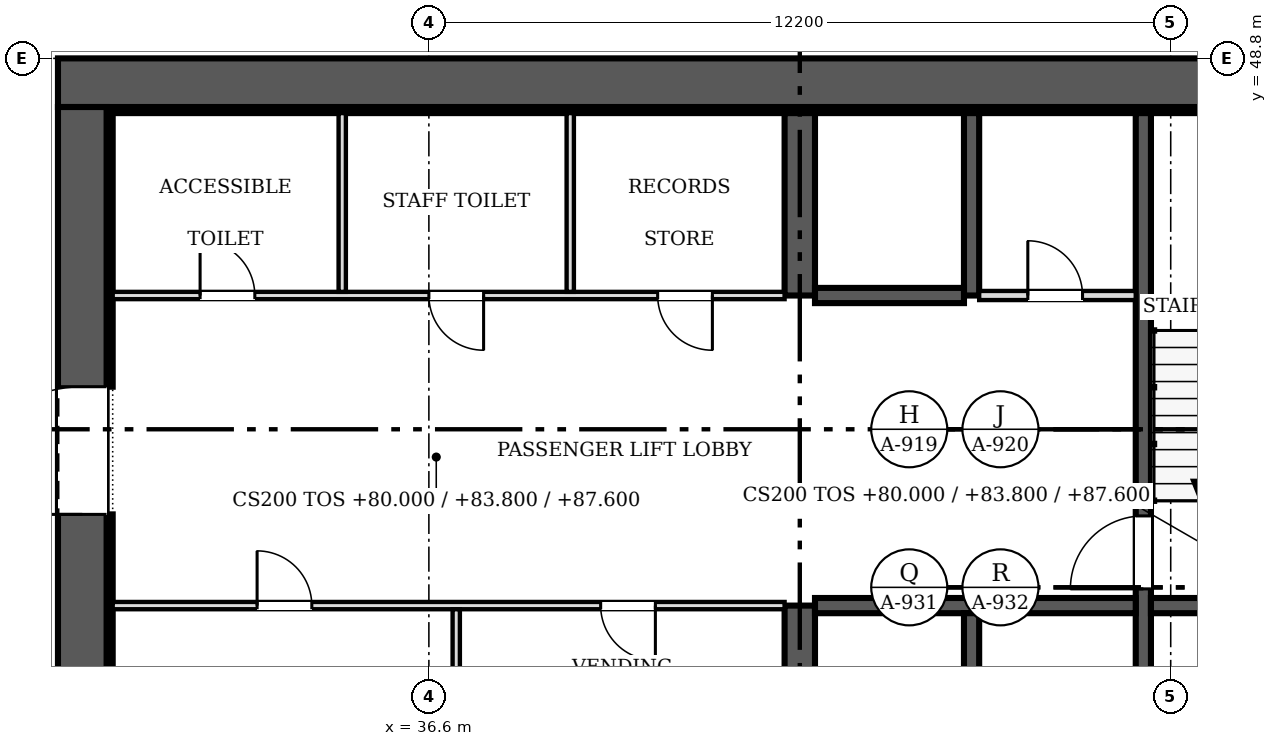
"""IFC4 building model, lengths in metres.
Left out: names, types, materials, properties, quantities, classifications, styles, units other than length and angle.
Written with IfcOpenShell. Run it as: python <this file> out.ifc"""

import sys

from ifc_helpers import new_model, si_unit, direction, frame, frame_2d, origin, place, context, subcontext, project, spatial, rectangle, extrude, source, transform, mapped, element, fill, save


model = new_model("IFC4")
c1 = context("Model", 3, precision=1e-05, world=origin(), true_north=direction((0.0, 1.0)))
c2 = subcontext(c1, "Body", "Model", "MODEL_VIEW")
j1 = project(units=[si_unit("LENGTHUNIT", "METRE"), si_unit("PLANEANGLEUNIT", "RADIAN")], contexts=[c1])
p1 = place(None, origin())
s1 = spatial("IfcSite", under=j1, at=p1, CompositionType="ELEMENT")
p2 = place(p1, origin())
s2 = spatial("IfcBuilding", under=s1, at=p2, CompositionType="ELEMENT")
p3 = place(p2, frame((0.0, 0.0, 80.0)))
s3 = spatial("IfcBuildingStorey", under=s2, at=p3, CompositionType="ELEMENT", Elevation=80.0)
p4 = place(p3, frame((30.9, 25.2, 0.0), z_axis=(0.0, 0.0, 1.0), x_axis=(0.0, 1.0, 0.0)))
e1 = element("IfcWall", 1, at=p4, inside=s3, PredefinedType="SHEAR", context=c2, shape_type="SweptSolid", body=[
    extrude(rectangle(XDim=22.8, YDim=0.8, at=frame_2d((11.4, 0.0))), origin(), (0.0, 0.0, 1.0), 3.8),
])
m1 = source(origin(), c2, "Body", "SweptSolid", [
    extrude(rectangle(XDim=2.1, YDim=2.4, at=frame_2d((1.05, 1.2))), frame((0.0, 0.41, 0.0), z_axis=(0.0, -1.0, 0.0), x_axis=(1.0, 0.0, 0.0)), (0.0, 0.0, 1.0), 0.82),
])
p5 = place(p4, frame((4.6, 0.0, 0.0)))
e2 = element("IfcOpeningElement", 2, at=p5, cuts=e1, PredefinedType="OPENING", context=c2, shape_type="MappedRepresentation", body=[
    mapped(m1, transform((0.0, 0.0, 0.0), scale=1.0)),
])
p6 = place(p4, frame((16.1, 0.0, 0.0)))
e3 = element("IfcOpeningElement", 3, at=p6, cuts=e1, PredefinedType="OPENING", context=c2, shape_type="MappedRepresentation", body=[
    mapped(m1, transform((0.0, 0.0, 0.0), scale=1.0)),
])
p7 = place(p3, frame((30.5, 48.4, 0.0), z_axis=(0.0, 0.0, 1.0), x_axis=(1.0, 0.0, 0.0)))
e4 = element("IfcWall", 4, at=p7, inside=s3, PredefinedType="SHEAR", context=c2, shape_type="SweptSolid", body=[
    extrude(rectangle(XDim=24.4, YDim=0.8, at=frame_2d((12.2, 0.0))), origin(), (0.0, 0.0, 1.0), 3.8),
])
p8 = place(p3, frame((31.3, 47.95, 0.0), z_axis=(0.0, 0.0, 1.0), x_axis=(1.0, 0.0, 0.0)))
e5 = element("IfcWall", 5, at=p8, inside=s3, PredefinedType="SOLIDWALL", context=c2, shape_type="SweptSolid", body=[
    extrude(rectangle(XDim=22.8, YDim=0.1, at=frame_2d((11.4, 0.0))), origin(), (0.0, 0.0, 1.0), 3.8),
])
p9 = place(p3, frame((31.35, 31.9, 0.0), z_axis=(0.0, 0.0, 1.0), x_axis=(0.0, 1.0, 0.0)))
e6 = element("IfcWall", 6, at=p9, inside=s3, PredefinedType="SOLIDWALL", context=c2, shape_type="SweptSolid", body=[
    extrude(rectangle(XDim=9.4, YDim=0.1, at=frame_2d((4.7, 0.0))), origin(), (0.0, 0.0, 1.0), 3.8),
])
p10 = place(p3, frame((31.35, 43.4, 0.0), z_axis=(0.0, 0.0, 1.0), x_axis=(0.0, 1.0, 0.0)))
e7 = element("IfcWall", 7, at=p10, inside=s3, PredefinedType="SOLIDWALL", context=c2, shape_type="SweptSolid", body=[
    extrude(rectangle(XDim=4.5, YDim=0.1, at=frame_2d((2.25, 0.0))), origin(), (0.0, 0.0, 1.0), 3.8),
])
p11 = place(p3, frame((42.7, 36.85, 0.0), z_axis=(0.0, 0.0, 1.0), x_axis=(0.0, 1.0, 0.0)))
e8 = element("IfcWall", 8, at=p11, inside=s3, PredefinedType="SHEAR", context=c2, shape_type="SweptSolid", body=[
    extrude(rectangle(XDim=2.95, YDim=0.5, at=frame_2d((1.475, 0.0))), origin(), (0.0, 0.0, 1.0), 3.8),
])
p12 = place(p3, frame((42.7, 44.9, 0.0), z_axis=(0.0, 0.0, 1.0), x_axis=(0.0, 1.0, 0.0)))
e9 = element("IfcWall", 9, at=p12, inside=s3, PredefinedType="SHEAR", context=c2, shape_type="SweptSolid", body=[
    extrude(rectangle(XDim=3.0, YDim=0.5, at=frame_2d((1.5, 0.0))), origin(), (0.0, 0.0, 1.0), 3.8),
])
p13 = place(p3, frame((48.35, 47.9, 0.0), z_axis=(0.0, 0.0, 1.0), x_axis=(0.0, -1.0, 0.0)))
e10 = element("IfcWall", 10, at=p13, inside=s3, PredefinedType="SOLIDWALL", context=c2, shape_type="SweptSolid", body=[
    extrude(rectangle(XDim=11.05, YDim=0.25, at=frame_2d((5.525, 0.0))), origin(), (0.0, 0.0, 1.0), 3.8),
])
m2 = source(origin(), c2, "Body", "SweptSolid", [
    extrude(rectangle(XDim=1.2, YDim=2.1, at=frame_2d((0.6, 1.05))), frame((0.0, 0.135, 0.0), z_axis=(0.0, -1.0, 0.0), x_axis=(1.0, 0.0, 0.0)), (0.0, 0.0, 1.0), 0.27),
])
p14 = place(p13, frame((6.625, 0.0, 0.0)))
e11 = element("IfcOpeningElement", 11, at=p14, cuts=e10, PredefinedType="OPENING", context=c2, shape_type="MappedRepresentation", body=[
    mapped(m2, transform((0.0, 0.0, 0.0), scale=1.0)),
])
p15 = place(p3, frame((42.95, 39.8, 0.0), z_axis=(0.0, 0.0, 1.0), x_axis=(1.0, 0.0, 0.0)))
e12 = element("IfcWall", 12, at=p15, inside=s3, PredefinedType="SOLIDWALL", context=c2, shape_type="SweptSolid", body=[
    extrude(rectangle(XDim=5.275, YDim=0.25, at=frame_2d((2.638, 0.0))), origin(), (0.0, 0.0, 1.0), 3.8),
])
p16 = place(p3, frame((48.475, 39.8, 0.0), z_axis=(0.0, 0.0, 1.0), x_axis=(1.0, 0.0, 0.0)))
e13 = element("IfcWall", 13, at=p16, inside=s3, PredefinedType="SOLIDWALL", context=c2, shape_type="SweptSolid", body=[
    extrude(rectangle(XDim=3.525, YDim=0.25, at=frame_2d((1.762, 0.0))), origin(), (0.0, 0.0, 1.0), 3.8),
])
p17 = place(p3, frame((45.525, 36.85, 0.0), z_axis=(0.0, 0.0, 1.0), x_axis=(0.0, 1.0, 0.0)))
e14 = element("IfcWall", 14, at=p17, inside=s3, PredefinedType="SOLIDWALL", context=c2, shape_type="SweptSolid", body=[
    extrude(rectangle(XDim=2.825, YDim=0.25, at=frame_2d((1.413, 0.0))), origin(), (0.0, 0.0, 1.0), 3.8),
])
p18 = place(p3, frame((45.525, 44.9, 0.0), z_axis=(0.0, 0.0, 1.0), x_axis=(0.0, 1.0, 0.0)))
e15 = element("IfcWall", 15, at=p18, inside=s3, PredefinedType="SOLIDWALL", context=c2, shape_type="SweptSolid", body=[
    extrude(rectangle(XDim=3.0, YDim=0.25, at=frame_2d((1.5, 0.0))), origin(), (0.0, 0.0, 1.0), 3.8),
])
p19 = place(p3, frame((42.95, 44.9, 0.0), z_axis=(0.0, 0.0, 1.0), x_axis=(1.0, 0.0, 0.0)))
e16 = element("IfcWall", 16, at=p19, inside=s3, PredefinedType="SOLIDWALL", context=c2, shape_type="SweptSolid", body=[
    extrude(rectangle(XDim=2.45, YDim=0.25, at=frame_2d((1.225, 0.0))), origin(), (0.0, 0.0, 1.0), 3.8),
])
p20 = place(p3, frame((42.45, 39.8, 0.0), z_axis=(0.0, 0.0, 1.0), x_axis=(-1.0, 0.0, 0.0)))
e17 = element("IfcWall", 17, at=p20, inside=s3, PredefinedType="PARTITIONING", context=c2, shape_type="SweptSolid", body=[
    extrude(rectangle(XDim=11.05, YDim=0.12, at=frame_2d((5.525, 0.0))), origin(), (0.0, 0.0, 1.0), 3.6),
])
m3 = source(origin(), c2, "Body", "SweptSolid", [
    extrude(rectangle(XDim=0.9, YDim=2.1, at=frame_2d((0.45, 1.05))), frame((0.0, 0.07, 0.0), z_axis=(0.0, -1.0, 0.0), x_axis=(1.0, 0.0, 0.0)), (0.0, 0.0, 1.0), 0.14),
])
p21 = place(p20, frame((7.775, 0.0, 0.0)))
e18 = element("IfcOpeningElement", 18, at=p21, cuts=e17, PredefinedType="OPENING", context=c2, shape_type="MappedRepresentation", body=[
    mapped(m3, transform((0.0, 0.0, 0.0), scale=1.0)),
])
p22 = place(p20, frame((2.125, 0.0, 0.0)))
e19 = element("IfcOpeningElement", 19, at=p22, cuts=e17, PredefinedType="OPENING", context=c2, shape_type="MappedRepresentation", body=[
    mapped(m3, transform((0.0, 0.0, 0.0), scale=1.0)),
])
p23 = place(p3, frame((31.4, 44.9, 0.0), z_axis=(0.0, 0.0, 1.0), x_axis=(1.0, 0.0, 0.0)))
e20 = element("IfcWall", 20, at=p23, inside=s3, PredefinedType="PARTITIONING", context=c2, shape_type="SweptSolid", body=[
    extrude(rectangle(XDim=11.05, YDim=0.12, at=frame_2d((5.525, 0.0))), origin(), (0.0, 0.0, 1.0), 3.6),
])
p24 = place(p23, frame((1.438, 0.0, 0.0)))
e21 = element("IfcOpeningElement", 21, at=p24, cuts=e20, PredefinedType="OPENING", context=c2, shape_type="MappedRepresentation", body=[
    mapped(m3, transform((0.0, 0.0, 0.0), scale=1.0)),
])
p25 = place(p23, frame((5.2, 0.0, 0.0)))
e22 = element("IfcOpeningElement", 22, at=p25, cuts=e20, PredefinedType="OPENING", context=c2, shape_type="MappedRepresentation", body=[
    mapped(m3, transform((0.0, 0.0, 0.0), scale=1.0)),
])
p26 = place(p23, frame((8.962, 0.0, 0.0)))
e23 = element("IfcOpeningElement", 23, at=p26, cuts=e20, PredefinedType="OPENING", context=c2, shape_type="MappedRepresentation", body=[
    mapped(m3, transform((0.0, 0.0, 0.0), scale=1.0)),
])
p27 = place(p3, frame((37.05, 36.85, 0.0), z_axis=(0.0, 0.0, 1.0), x_axis=(0.0, 1.0, 0.0)))
e24 = element("IfcWall", 24, at=p27, inside=s3, PredefinedType="PARTITIONING", context=c2, shape_type="SweptSolid", body=[
    extrude(rectangle(XDim=2.89, YDim=0.12, at=frame_2d((1.445, 0.0))), origin(), (0.0, 0.0, 1.0), 3.6),
])
for number, where, z_axis, x_axis in (
    (25, (35.175, 44.96, 0.0), (0.0, 0.0, 1.0), (0.0, 1.0, 0.0)),
    (26, (38.925, 44.96, 0.0), (0.0, 0.0, 1.0), (0.0, 1.0, 0.0)),
):
    element("IfcWall", number, at=place(p3, frame(where, z_axis=z_axis, x_axis=x_axis)), inside=s3, PredefinedType="PARTITIONING", context=c2, shape_type="SweptSolid", body=[
        extrude(rectangle(XDim=2.94, YDim=0.12, at=frame_2d((1.47, 0.0))), origin(), (0.0, 0.0, 1.0), 3.6),
    ])
p28 = place(p3, frame((45.65, 44.9, 0.0), z_axis=(0.0, 0.0, 1.0), x_axis=(1.0, 0.0, 0.0)))
e27 = element("IfcWall", 27, at=p28, inside=s3, PredefinedType="PARTITIONING", context=c2, shape_type="SweptSolid", body=[
    extrude(rectangle(XDim=2.575, YDim=0.15, at=frame_2d((1.288, 0.0))), origin(), (0.0, 0.0, 1.0), 3.6),
])
m4 = source(origin(), c2, "Body", "SweptSolid", [
    extrude(rectangle(XDim=0.9, YDim=2.1, at=frame_2d((0.45, 1.05))), frame((0.0, 0.085, 0.0), z_axis=(0.0, -1.0, 0.0), x_axis=(1.0, 0.0, 0.0)), (0.0, 0.0, 1.0), 0.17),
])
p29 = place(p28, frame((0.8, 0.0, 0.0)))
e28 = element("IfcOpeningElement", 28, at=p29, cuts=e27, PredefinedType="OPENING", context=c2, shape_type="MappedRepresentation", body=[
    mapped(m4, transform((0.0, 0.0, 0.0), scale=1.0)),
])
m5 = source(origin(), c2, "Body", "SweptSolid", [
    extrude(rectangle(XDim=2.1, YDim=2.4, at=frame_2d((1.05, 1.2))), frame((0.0, 0.025, 0.0), z_axis=(0.0, -1.0, 0.0), x_axis=(1.0, 0.0, 0.0)), (0.0, 0.0, 1.0), 0.05),
])
p30 = place(p6, origin())
e29 = element("IfcDoor", 29, at=p30, inside=s3, OperationType="DOUBLE_DOOR_SINGLE_SWING", PredefinedType="DOOR", context=c2, shape_type="MappedRepresentation", body=[
    mapped(m5, transform((0.0, 0.0, 0.0), scale=1.0)),
])
fill(e3, e29)
m6 = source(origin(), c2, "Body", "SweptSolid", [
    extrude(rectangle(XDim=1.2, YDim=2.1, at=frame_2d((0.6, 1.05))), frame((0.0, 0.025, 0.0), z_axis=(0.0, -1.0, 0.0), x_axis=(1.0, 0.0, 0.0)), (0.0, 0.0, 1.0), 0.05),
])
p31 = place(p14, origin())
e30 = element("IfcDoor", 30, at=p31, inside=s3, OperationType="SINGLE_SWING_RIGHT", PredefinedType="DOOR", context=c2, shape_type="MappedRepresentation", body=[
    mapped(m6, transform((0.0, 0.0, 0.0), scale=1.0)),
])
fill(e11, e30)
m7 = source(origin(), c2, "Body", "SweptSolid", [
    extrude(rectangle(XDim=0.9, YDim=2.1, at=frame_2d((0.45, 1.05))), frame((0.0, 0.025, 0.0), z_axis=(0.0, -1.0, 0.0), x_axis=(1.0, 0.0, 0.0)), (0.0, 0.0, 1.0), 0.05),
])
p32 = place(p21, origin())
e31 = element("IfcDoor", 31, at=p32, inside=s3, OperationType="SINGLE_SWING_RIGHT", PredefinedType="DOOR", context=c2, shape_type="MappedRepresentation", body=[
    mapped(m7, transform((0.0, 0.0, 0.0), scale=1.0)),
])
fill(e18, e31)
p33 = place(p22, origin())
e32 = element("IfcDoor", 32, at=p33, inside=s3, OperationType="SINGLE_SWING_LEFT", PredefinedType="DOOR", context=c2, shape_type="MappedRepresentation", body=[
    mapped(m7, transform((0.0, 0.0, 0.0), scale=1.0)),
])
fill(e19, e32)
p34 = place(p24, origin())
e33 = element("IfcDoor", 33, at=p34, inside=s3, OperationType="SINGLE_SWING_LEFT", PredefinedType="DOOR", context=c2, shape_type="MappedRepresentation", body=[
    mapped(m7, transform((0.0, 0.0, 0.0), scale=1.0)),
])
fill(e21, e33)
p35 = place(p25, origin())
e34 = element("IfcDoor", 34, at=p35, inside=s3, OperationType="SINGLE_SWING_RIGHT", PredefinedType="DOOR", context=c2, shape_type="MappedRepresentation", body=[
    mapped(m7, transform((0.0, 0.0, 0.0), scale=1.0)),
])
fill(e22, e34)
p36 = place(p26, origin())
e35 = element("IfcDoor", 35, at=p36, inside=s3, OperationType="SINGLE_SWING_RIGHT", PredefinedType="DOOR", context=c2, shape_type="MappedRepresentation", body=[
    mapped(m7, transform((0.0, 0.0, 0.0), scale=1.0)),
])
fill(e23, e35)
p37 = place(p29, origin())
e36 = element("IfcDoor", 36, at=p37, inside=s3, OperationType="SINGLE_SWING_LEFT", PredefinedType="DOOR", context=c2, shape_type="MappedRepresentation", body=[
    mapped(m7, transform((0.0, 0.0, 0.0), scale=1.0)),
])
fill(e28, e36)
save(model, sys.argv[1])
